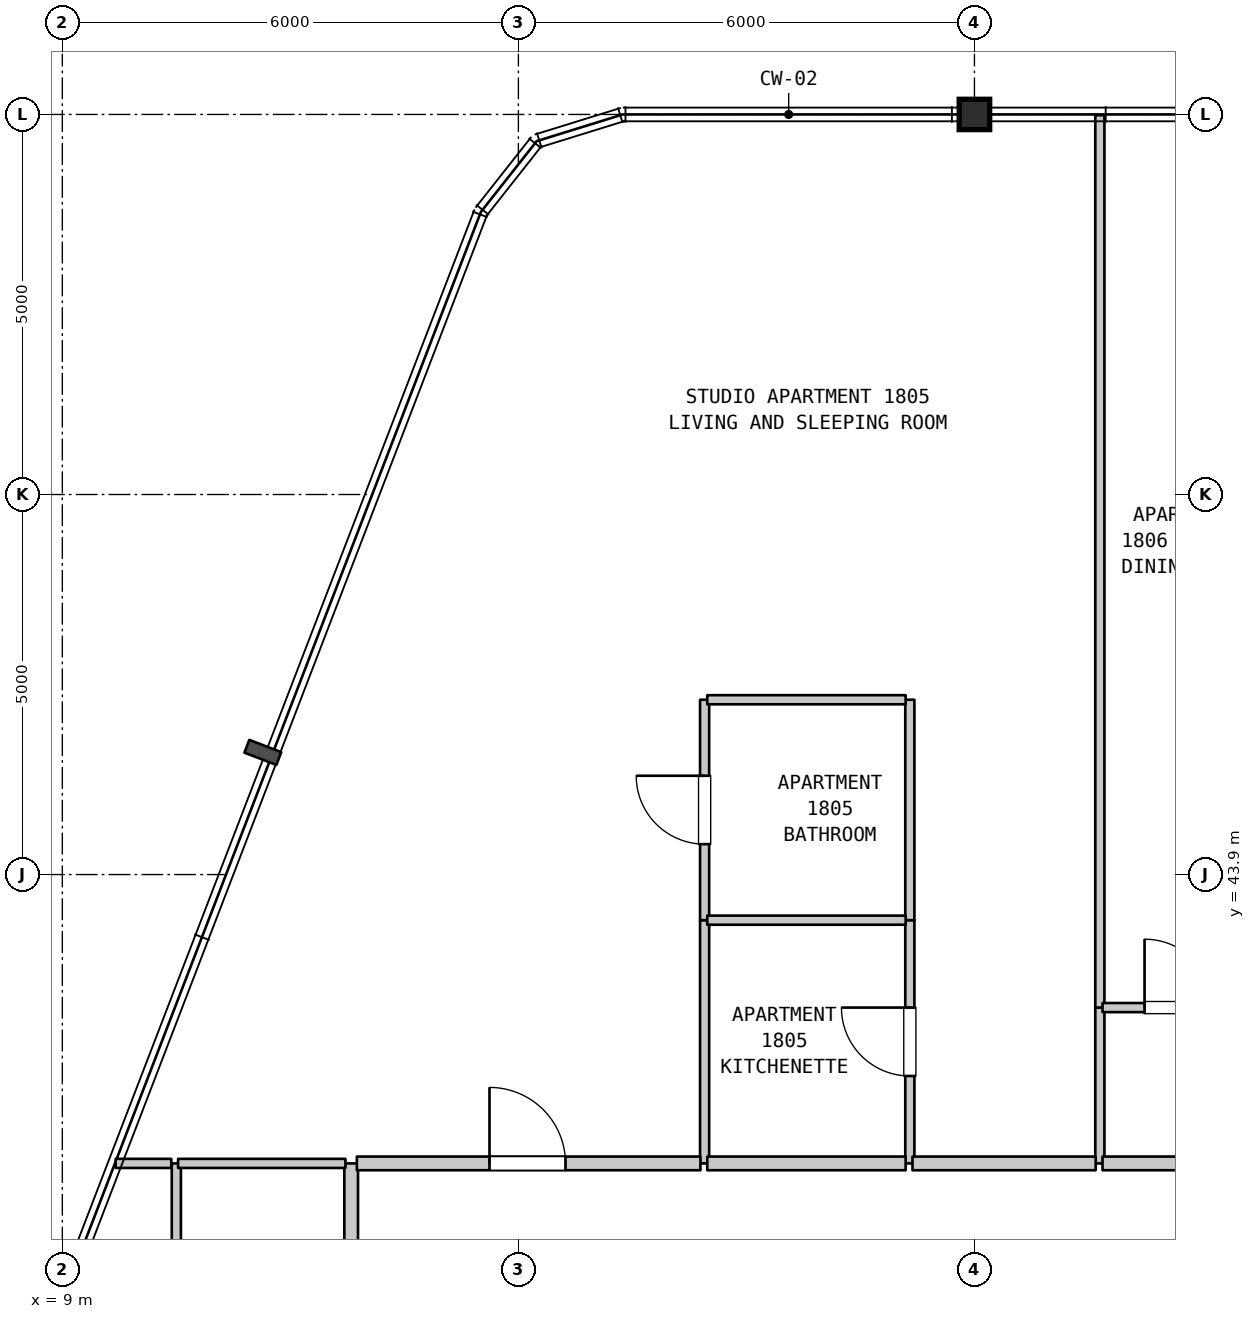
"""IFC4 building model, lengths in metres.
Left out: names, types, materials, properties, quantities, classifications, styles, units other than length and angle.
Written with IfcOpenShell. Run it as: python <this file> out.ifc"""

import sys

from ifc_helpers import new_model, si_unit, direction, frame, frame_2d, origin, origin_2d, place, context, subcontext, project, spatial, rectangle, i_section, extrude, element, fill, save


model = new_model("IFC4")
c1 = context("Model", 3, precision=1e-05, world=origin(), true_north=direction((0.0, 1.0)))
c2 = subcontext(c1, "Body", "Model", "MODEL_VIEW")
j1 = project(units=[si_unit("LENGTHUNIT", "METRE"), si_unit("PLANEANGLEUNIT", "RADIAN")], contexts=[c1])
p1 = place(None, origin())
s1 = spatial("IfcSite", under=j1, at=p1, CompositionType="ELEMENT")
p2 = place(p1, origin())
s2 = spatial("IfcBuilding", under=s1, at=p2, CompositionType="ELEMENT")
p3 = place(p2, frame((0.0, 0.0, 77.5)))
s3 = spatial("IfcBuildingStorey", under=s2, at=p3, CompositionType="ELEMENT", Elevation=77.5)
p4 = place(p3, frame((21.0, 53.9, 0.0), z_axis=(0.0, 0.0, 1.0), x_axis=(1.0, 0.0, 0.0)))
e1 = element("IfcColumn", 1, at=p4, inside=s3, PredefinedType="COLUMN", context=c2, shape_type="SweptSolid", body=[
    extrude(i_section(OverallWidth=0.401, OverallDepth=0.399, WebThickness=0.025, FlangeThickness=0.04, FilletRadius=0.015, at=origin_2d()), origin(), (0.0, 0.0, 1.0), 3.7),
])
p5 = place(p3, frame((10.5, 31.09, 0.0), z_axis=(0.0, 0.0, 1.0), x_axis=(0.0, 1.0, 0.0)))
e2 = element("IfcWall", 2, at=p5, inside=s3, PredefinedType="PARTITIONING", context=c2, shape_type="SweptSolid", body=[
    extrude(rectangle(XDim=9.01, YDim=0.12, at=frame_2d((4.505, 0.0))), origin(), (0.0, 0.0, 1.0), 3.28),
])
p6 = place(p3, frame((12.8, 31.09, 0.0), z_axis=(0.0, 0.0, 1.0), x_axis=(0.0, 1.0, 0.0)))
e3 = element("IfcWall", 3, at=p6, inside=s3, PredefinedType="STANDARD", context=c2, shape_type="SweptSolid", body=[
    extrude(rectangle(XDim=9.01, YDim=0.18, at=frame_2d((4.505, 0.0))), origin(), (0.0, 0.0, 1.0), 3.28),
])
p7 = place(p3, frame((17.45, 40.1, 0.0), z_axis=(0.0, 0.0, 1.0), x_axis=(0.0, 1.0, 0.0)))
e4 = element("IfcWall", 4, at=p7, inside=s3, PredefinedType="PARTITIONING", context=c2, shape_type="SweptSolid", body=[
    extrude(rectangle(XDim=3.2, YDim=0.12, at=frame_2d((1.6, 0.0))), origin(), (0.0, 0.0, 1.0), 3.28),
])
p8 = place(p3, frame((17.45, 43.3, 0.0), z_axis=(0.0, 0.0, 1.0), x_axis=(0.0, 1.0, 0.0)))
e5 = element("IfcWall", 5, at=p8, inside=s3, PredefinedType="PARTITIONING", context=c2, shape_type="SweptSolid", body=[
    extrude(rectangle(XDim=2.9, YDim=0.12, at=frame_2d((1.45, 0.0))), origin(), (0.0, 0.0, 1.0), 3.28),
])
p9 = place(p8, frame((1.0, 0.0, 0.0)))
e6 = element("IfcOpeningElement", 6, at=p9, cuts=e5, PredefinedType="OPENING", context=c2, shape_type="SweptSolid", body=[
    extrude(rectangle(XDim=0.9, YDim=2.1, at=frame_2d((0.45, 1.05))), frame((0.0, 0.07, 0.0), z_axis=(0.0, -1.0, 0.0), x_axis=(1.0, 0.0, 0.0)), (0.0, 0.0, 1.0), 0.14),
])
p10 = place(p3, frame((20.15, 40.1, 0.0), z_axis=(0.0, 0.0, 1.0), x_axis=(0.0, 1.0, 0.0)))
e7 = element("IfcWall", 7, at=p10, inside=s3, PredefinedType="PARTITIONING", context=c2, shape_type="SweptSolid", body=[
    extrude(rectangle(XDim=3.2, YDim=0.12, at=frame_2d((1.6, 0.0))), origin(), (0.0, 0.0, 1.0), 3.28),
])
p11 = place(p10, frame((1.15, 0.0, 0.0)))
e8 = element("IfcOpeningElement", 8, at=p11, cuts=e7, PredefinedType="OPENING", context=c2, shape_type="SweptSolid", body=[
    extrude(rectangle(XDim=0.9, YDim=2.15, at=frame_2d((0.45, 1.075))), frame((0.0, 0.07, 0.0), z_axis=(0.0, -1.0, 0.0), x_axis=(1.0, 0.0, 0.0)), (0.0, 0.0, 1.0), 0.14),
])
p12 = place(p3, frame((20.15, 43.3, 0.0), z_axis=(0.0, 0.0, 1.0), x_axis=(0.0, 1.0, 0.0)))
e9 = element("IfcWall", 9, at=p12, inside=s3, PredefinedType="PARTITIONING", context=c2, shape_type="SweptSolid", body=[
    extrude(rectangle(XDim=2.9, YDim=0.12, at=frame_2d((1.45, 0.0))), origin(), (0.0, 0.0, 1.0), 3.28),
])
p13 = place(p3, frame((22.65, 40.1, 0.0), z_axis=(0.0, 0.0, 1.0), x_axis=(0.0, 1.0, 0.0)))
e10 = element("IfcWall", 10, at=p13, inside=s3, PredefinedType="PARTITIONING", context=c2, shape_type="SweptSolid", body=[
    extrude(rectangle(XDim=2.05, YDim=0.12, at=frame_2d((1.025, 0.0))), origin(), (0.0, 0.0, 1.0), 3.28),
])
p14 = place(p3, frame((22.65, 42.15, 0.0), z_axis=(0.0, 0.0, 1.0), x_axis=(0.0, 1.0, 0.0)))
e11 = element("IfcWall", 11, at=p14, inside=s3, PredefinedType="PARTITIONING", context=c2, shape_type="SweptSolid", body=[
    extrude(rectangle(XDim=11.74, YDim=0.12, at=frame_2d((5.87, 0.0))), origin(), (0.0, 0.0, 1.0), 3.28),
])
p15 = place(p3, frame((9.702, 40.1, 0.0), z_axis=(0.0, 0.0, 1.0), x_axis=(1.0, 0.0, 0.0)))
e12 = element("IfcWall", 12, at=p15, inside=s3, PredefinedType="PARTITIONING", context=c2, shape_type="SweptSolid", body=[
    extrude(rectangle(XDim=0.731, YDim=0.12, at=frame_2d((0.366, 0.0))), origin(), (0.0, 0.0, 1.0), 3.28),
])
p16 = place(p3, frame((10.523, 40.1, 0.0), z_axis=(0.0, 0.0, 1.0), x_axis=(1.0, 0.0, 0.0)))
e13 = element("IfcWall", 13, at=p16, inside=s3, PredefinedType="PARTITIONING", context=c2, shape_type="SweptSolid", body=[
    extrude(rectangle(XDim=2.202, YDim=0.12, at=frame_2d((1.101, 0.0))), origin(), (0.0, 0.0, 1.0), 3.28),
])
p17 = place(p3, frame((12.875, 40.1, 0.0), z_axis=(0.0, 0.0, 1.0), x_axis=(1.0, 0.0, 0.0)))
e14 = element("IfcWall", 14, at=p17, inside=s3, PredefinedType="STANDARD", context=c2, shape_type="SweptSolid", body=[
    extrude(rectangle(XDim=4.52, YDim=0.18, at=frame_2d((2.26, 0.0))), origin(), (0.0, 0.0, 1.0), 3.28),
])
p18 = place(p17, frame((1.745, 0.0, 0.0)))
e15 = element("IfcOpeningElement", 15, at=p18, cuts=e14, PredefinedType="OPENING", context=c2, shape_type="SweptSolid", body=[
    extrude(rectangle(XDim=1.0, YDim=2.15, at=frame_2d((0.5, 1.075))), frame((0.0, 0.1, 0.0), z_axis=(0.0, -1.0, 0.0), x_axis=(1.0, 0.0, 0.0)), (0.0, 0.0, 1.0), 0.2),
])
p19 = place(p3, frame((17.485, 40.1, 0.0), z_axis=(0.0, 0.0, 1.0), x_axis=(1.0, 0.0, 0.0)))
e16 = element("IfcWall", 16, at=p19, inside=s3, PredefinedType="STANDARD", context=c2, shape_type="SweptSolid", body=[
    extrude(rectangle(XDim=2.61, YDim=0.18, at=frame_2d((1.305, 0.0))), origin(), (0.0, 0.0, 1.0), 3.28),
])
p20 = place(p3, frame((20.185, 40.1, 0.0), z_axis=(0.0, 0.0, 1.0), x_axis=(1.0, 0.0, 0.0)))
e17 = element("IfcWall", 17, at=p20, inside=s3, PredefinedType="STANDARD", context=c2, shape_type="SweptSolid", body=[
    extrude(rectangle(XDim=2.41, YDim=0.18, at=frame_2d((1.205, 0.0))), origin(), (0.0, 0.0, 1.0), 3.28),
])
p21 = place(p3, frame((22.685, 40.1, 0.0), z_axis=(0.0, 0.0, 1.0), x_axis=(1.0, 0.0, 0.0)))
e18 = element("IfcWall", 18, at=p21, inside=s3, PredefinedType="STANDARD", context=c2, shape_type="SweptSolid", body=[
    extrude(rectangle(XDim=4.86, YDim=0.18, at=frame_2d((2.43, 0.0))), origin(), (0.0, 0.0, 1.0), 3.28),
])
p22 = place(p21, frame((1.658, 0.0, 0.0)))
e19 = element("IfcOpeningElement", 19, at=p22, cuts=e18, PredefinedType="OPENING", context=c2, shape_type="SweptSolid", body=[
    extrude(rectangle(XDim=1.0, YDim=2.15, at=frame_2d((0.5, 1.075))), frame((0.0, 0.1, 0.0), z_axis=(0.0, -1.0, 0.0), x_axis=(1.0, 0.0, 0.0)), (0.0, 0.0, 1.0), 0.2),
])
p23 = place(p3, frame((22.685, 42.15, 0.0), z_axis=(0.0, 0.0, 1.0), x_axis=(1.0, 0.0, 0.0)))
e20 = element("IfcWall", 20, at=p23, inside=s3, PredefinedType="PARTITIONING", context=c2, shape_type="SweptSolid", body=[
    extrude(rectangle(XDim=2.16, YDim=0.12, at=frame_2d((1.08, 0.0))), origin(), (0.0, 0.0, 1.0), 3.28),
])
p24 = place(p23, frame((0.553, 0.0, 0.0)))
e21 = element("IfcOpeningElement", 21, at=p24, cuts=e20, PredefinedType="OPENING", context=c2, shape_type="SweptSolid", body=[
    extrude(rectangle(XDim=0.9, YDim=2.15, at=frame_2d((0.45, 1.075))), frame((0.0, 0.07, 0.0), z_axis=(0.0, -1.0, 0.0), x_axis=(1.0, 0.0, 0.0)), (0.0, 0.0, 1.0), 0.14),
])
for number, where, z_axis, x_axis in (
    (22, (17.485, 43.3, 0.0), (0.0, 0.0, 1.0), (1.0, 0.0, 0.0)),
    (23, (17.485, 46.2, 0.0), (0.0, 0.0, 1.0), (1.0, 0.0, 0.0)),
):
    element("IfcWall", number, at=place(p3, frame(where, z_axis=z_axis, x_axis=x_axis)), inside=s3, PredefinedType="PARTITIONING", context=c2, shape_type="SweptSolid", body=[
        extrude(rectangle(XDim=2.61, YDim=0.12, at=frame_2d((1.305, 0.0))), origin(), (0.0, 0.0, 1.0), 3.28),
    ])
p25 = place(p9, origin())
e24 = element("IfcDoor", 24, at=p25, inside=s3, OperationType="SINGLE_SWING_RIGHT", PredefinedType="DOOR", context=c2, shape_type="SweptSolid", body=[
    extrude(rectangle(XDim=0.9, YDim=2.1, at=frame_2d((0.45, 1.05))), frame((0.0, 0.025, 0.0), z_axis=(0.0, -1.0, 0.0), x_axis=(1.0, 0.0, 0.0)), (0.0, 0.0, 1.0), 0.05),
])
fill(e6, e24)
p26 = place(p11, origin())
e25 = element("IfcDoor", 25, at=p26, inside=s3, OperationType="SINGLE_SWING_RIGHT", PredefinedType="DOOR", context=c2, shape_type="SweptSolid", body=[
    extrude(rectangle(XDim=0.9, YDim=2.15, at=frame_2d((0.45, 1.075))), frame((0.0, 0.025, 0.0), z_axis=(0.0, -1.0, 0.0), x_axis=(1.0, 0.0, 0.0)), (0.0, 0.0, 1.0), 0.05),
])
fill(e8, e25)
p27 = place(p18, origin())
e26 = element("IfcDoor", 26, at=p27, inside=s3, OperationType="SINGLE_SWING_LEFT", PredefinedType="DOOR", context=c2, shape_type="SweptSolid", body=[
    extrude(rectangle(XDim=1.0, YDim=2.15, at=frame_2d((0.5, 1.075))), frame((0.0, 0.025, 0.0), z_axis=(0.0, -1.0, 0.0), x_axis=(1.0, 0.0, 0.0)), (0.0, 0.0, 1.0), 0.05),
])
fill(e15, e26)
p28 = place(p24, origin())
e27 = element("IfcDoor", 27, at=p28, inside=s3, OperationType="SINGLE_SWING_LEFT", PredefinedType="DOOR", context=c2, shape_type="SweptSolid", body=[
    extrude(rectangle(XDim=0.9, YDim=2.15, at=frame_2d((0.45, 1.075))), frame((0.0, 0.025, 0.0), z_axis=(0.0, -1.0, 0.0), x_axis=(1.0, 0.0, 0.0)), (0.0, 0.0, 1.0), 0.05),
])
fill(e21, e27)
save(model, sys.argv[1])
